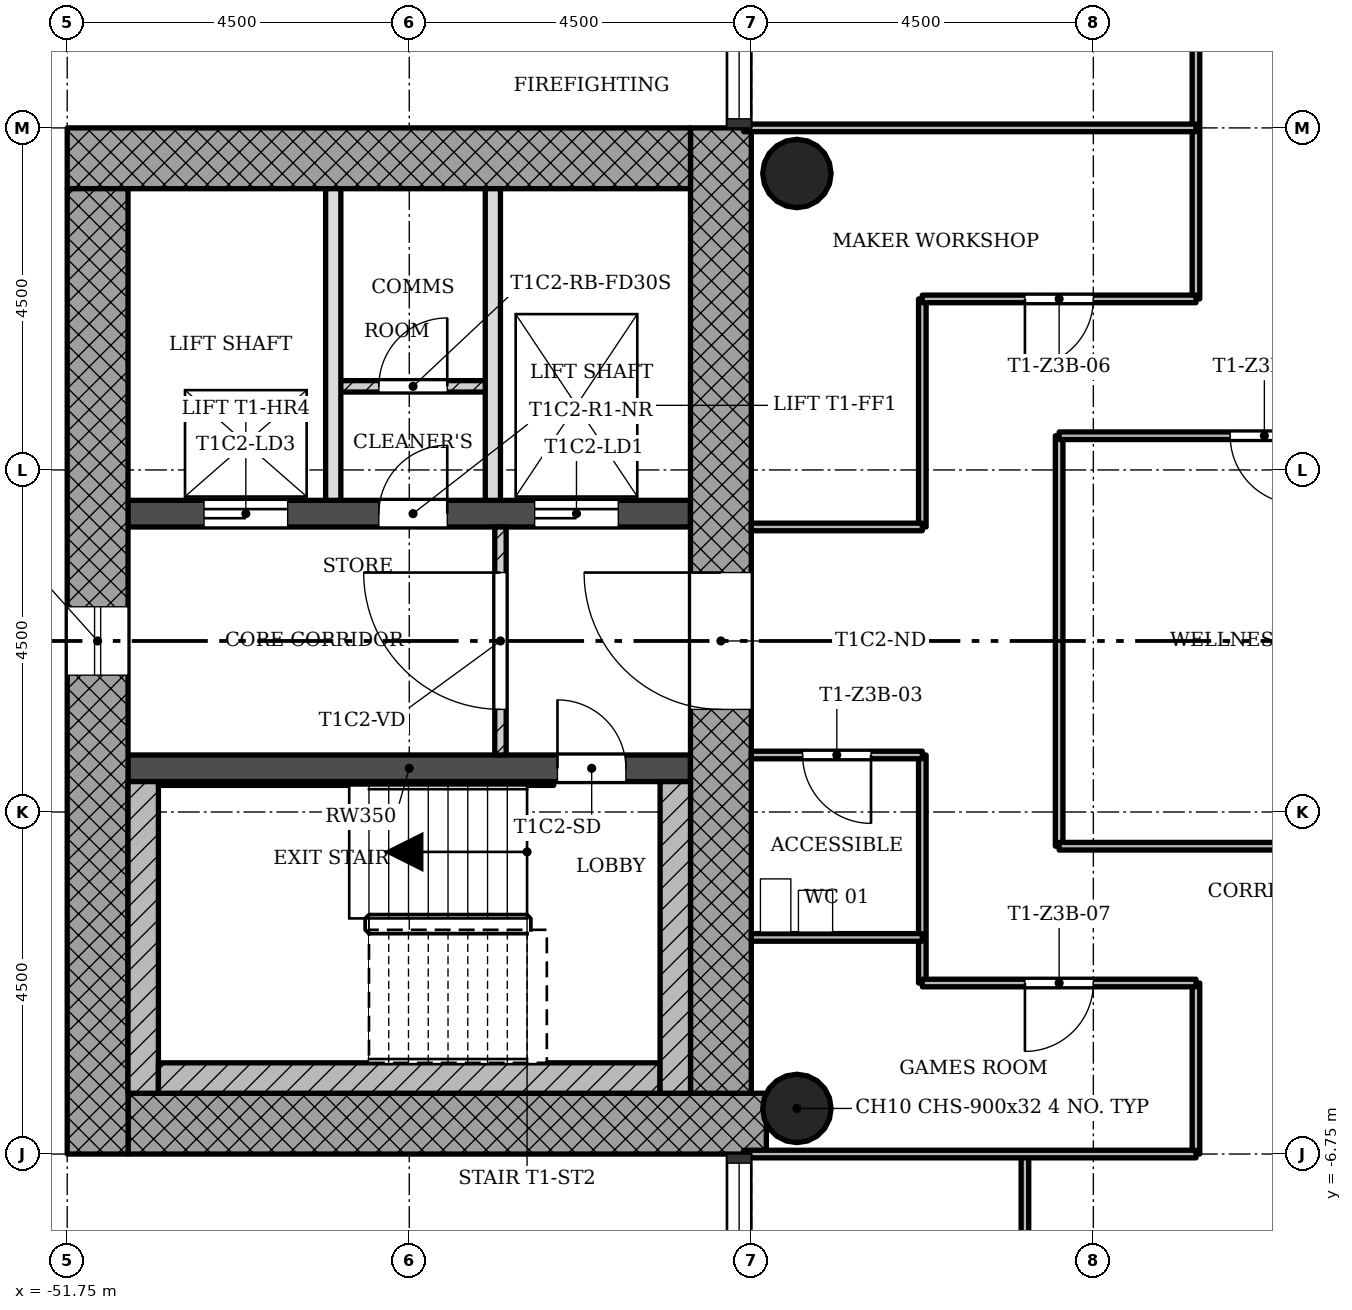
"""IFC4 building model, lengths in metres.
Left out: names, types, materials, properties, quantities, classifications, styles, units other than length and angle.
Written with IfcOpenShell. Run it as: python <this file> out.ifc"""

import sys

from ifc_helpers import new_model, si_unit, direction, frame, frame_2d, origin, origin_2d, place, context, subcontext, project, spatial, rectangle, hollow_circle, extrude, element, fill, save


model = new_model("IFC4")
c1 = context("Model", 3, precision=1e-05, world=origin(), true_north=direction((0.0, 1.0)))
c2 = subcontext(c1, "Body", "Model", "MODEL_VIEW")
j1 = project(units=[si_unit("LENGTHUNIT", "METRE"), si_unit("PLANEANGLEUNIT", "RADIAN")], contexts=[c1])
p1 = place(None, origin())
s1 = spatial("IfcSite", under=j1, at=p1, CompositionType="ELEMENT")
p2 = place(p1, origin())
s2 = spatial("IfcBuilding", under=s1, at=p2, CompositionType="ELEMENT")
p3 = place(p2, frame((0.0, 0.0, 150.7)))
s3 = spatial("IfcBuildingStorey", under=s2, at=p3, CompositionType="ELEMENT", Elevation=150.7)
p4 = place(p3, frame((-50.95, -6.35, 0.0), z_axis=(0.0, 0.0, 1.0), x_axis=(1.0, 0.0, 0.0)))
e1 = element("IfcWall", 1, at=p4, inside=s3, PredefinedType="SHEAR", context=c2, shape_type="SweptSolid", body=[
    extrude(rectangle(XDim=8.398, YDim=0.8, at=frame_2d((4.199, 0.0))), origin(), (0.0, 0.0, 1.0), 3.4),
])
p5 = place(p3, frame((-43.15, -5.95, 0.0), z_axis=(0.0, 0.0, 1.0), x_axis=(0.0, 1.0, 0.0)))
e2 = element("IfcWall", 2, at=p5, inside=s3, PredefinedType="SHEAR", context=c2, shape_type="SweptSolid", body=[
    extrude(rectangle(XDim=12.7, YDim=0.8, at=frame_2d((6.35, 0.0))), origin(), (0.0, 0.0, 1.0), 3.4),
])
p6 = place(p5, frame((5.05, 0.0, 0.0)))
e3 = element("IfcOpeningElement", 3, at=p6, cuts=e2, PredefinedType="OPENING", context=c2, shape_type="SweptSolid", body=[
    extrude(rectangle(XDim=1.8, YDim=2.1, at=frame_2d((0.9, 1.05))), frame((0.0, 0.41, 0.0), z_axis=(0.0, -1.0, 0.0), x_axis=(1.0, 0.0, 0.0)), (0.0, 0.0, 1.0), 0.82),
])
p7 = place(p3, frame((-43.55, 6.35, 0.0), z_axis=(0.0, 0.0, 1.0), x_axis=(-1.0, 0.0, 0.0)))
e4 = element("IfcWall", 4, at=p7, inside=s3, PredefinedType="SHEAR", context=c2, shape_type="SweptSolid", body=[
    extrude(rectangle(XDim=8.2, YDim=0.8, at=frame_2d((4.1, 0.0))), origin(), (0.0, 0.0, 1.0), 3.4),
])
p8 = place(p3, frame((-51.35, 5.95, 0.0), z_axis=(0.0, 0.0, 1.0), x_axis=(0.0, -1.0, 0.0)))
e5 = element("IfcWall", 5, at=p8, inside=s3, PredefinedType="SHEAR", context=c2, shape_type="SweptSolid", body=[
    extrude(rectangle(XDim=12.7, YDim=0.8, at=frame_2d((6.35, 0.0))), origin(), (0.0, 0.0, 1.0), 3.4),
])
p9 = place(p8, frame((5.5, 0.0, 0.45)))
e6 = element("IfcOpeningElement", 6, at=p9, cuts=e5, PredefinedType="OPENING", context=c2, shape_type="SweptSolid", body=[
    extrude(rectangle(XDim=0.9, YDim=2.4, at=frame_2d((0.45, 1.2))), frame((0.0, 0.41, 0.0), z_axis=(0.0, -1.0, 0.0), x_axis=(1.0, 0.0, 0.0)), (0.0, 0.0, 1.0), 0.82),
])
p10 = place(p3, frame((-50.95, -1.675, 0.0), z_axis=(0.0, 0.0, 1.0), x_axis=(1.0, 0.0, 0.0)))
e7 = element("IfcWall", 7, at=p10, inside=s3, PredefinedType="SHEAR", context=c2, shape_type="SweptSolid", body=[
    extrude(rectangle(XDim=7.4, YDim=0.35, at=frame_2d((3.7, 0.0))), origin(), (0.0, 0.0, 1.0), 3.4),
])
p11 = place(p10, frame((5.65, 0.0, 0.0)))
e8 = element("IfcOpeningElement", 8, at=p11, cuts=e7, PredefinedType="OPENING", context=c2, shape_type="SweptSolid", body=[
    extrude(rectangle(XDim=0.9, YDim=2.1, at=frame_2d((0.45, 1.05))), frame((0.0, 0.185, 0.0), z_axis=(0.0, -1.0, 0.0), x_axis=(1.0, 0.0, 0.0)), (0.0, 0.0, 1.0), 0.37),
])
p12 = place(p3, frame((-50.95, 1.675, 0.0), z_axis=(0.0, 0.0, 1.0), x_axis=(1.0, 0.0, 0.0)))
e9 = element("IfcWall", 9, at=p12, inside=s3, PredefinedType="SHEAR", context=c2, shape_type="SweptSolid", body=[
    extrude(rectangle(XDim=7.4, YDim=0.35, at=frame_2d((3.7, 0.0))), origin(), (0.0, 0.0, 1.0), 3.4),
])
p13 = place(p12, frame((5.35, 0.0, 0.0)))
e10 = element("IfcOpeningElement", 10, at=p13, cuts=e9, PredefinedType="OPENING", context=c2, shape_type="SweptSolid", body=[
    extrude(rectangle(XDim=1.1, YDim=2.1, at=frame_2d((0.55, 1.05))), frame((0.0, 0.185, 0.0), z_axis=(0.0, -1.0, 0.0), x_axis=(1.0, 0.0, 0.0)), (0.0, 0.0, 1.0), 0.37),
])
p14 = place(p12, frame((1.0, 0.0, 0.0)))
e11 = element("IfcOpeningElement", 11, at=p14, cuts=e9, PredefinedType="OPENING", context=c2, shape_type="SweptSolid", body=[
    extrude(rectangle(XDim=1.1, YDim=2.1, at=frame_2d((0.55, 1.05))), frame((0.0, 0.185, 0.0), z_axis=(0.0, -1.0, 0.0), x_axis=(1.0, 0.0, 0.0)), (0.0, 0.0, 1.0), 0.37),
])
p15 = place(p12, frame((3.3, 0.0, 0.0)))
e12 = element("IfcOpeningElement", 12, at=p15, cuts=e9, PredefinedType="OPENING", context=c2, shape_type="SweptSolid", body=[
    extrude(rectangle(XDim=0.9, YDim=2.1, at=frame_2d((0.45, 1.05))), frame((0.0, 0.185, 0.0), z_axis=(0.0, -1.0, 0.0), x_axis=(1.0, 0.0, 0.0)), (0.0, 0.0, 1.0), 0.37),
])
for number, where, z_axis, x_axis in (
    (13, (-42.15, -6.15, 0.0), (0.0, 0.0, 1.0), (1.0, 0.0, 0.0)),
    (14, (-42.15, 6.15, 0.0), (0.0, 0.0, 1.0), (1.0, 0.0, 0.0)),
):
    element("IfcColumn", number, at=place(p3, frame(where, z_axis=z_axis, x_axis=x_axis)), inside=s3, PredefinedType="COLUMN", context=c2, shape_type="SweptSolid", body=[
        extrude(hollow_circle(Radius=0.45, WallThickness=0.032, at=origin_2d()), origin(), (0.0, 0.0, 1.0), 3.4),
    ])
p16 = place(p3, frame((-46.05, 1.5, 0.0), z_axis=(0.0, 0.0, 1.0), x_axis=(0.0, -1.0, 0.0)))
e15 = element("IfcWall", 15, at=p16, inside=s3, PredefinedType="PARTITIONING", context=c2, shape_type="SweptSolid", body=[
    extrude(rectangle(XDim=3.0, YDim=0.15, at=frame_2d((1.5, 0.0))), origin(), (0.0, 0.0, 1.0), 3.0),
])
p17 = place(p16, frame((0.6, 0.0, 0.0)))
e16 = element("IfcOpeningElement", 16, at=p17, cuts=e15, PredefinedType="OPENING", context=c2, shape_type="SweptSolid", body=[
    extrude(rectangle(XDim=1.8, YDim=2.1, at=frame_2d((0.9, 1.05))), frame((0.0, 0.085, 0.0), z_axis=(0.0, -1.0, 0.0), x_axis=(1.0, 0.0, 0.0)), (0.0, 0.0, 1.0), 0.17),
])
for number, where, z_axis, x_axis in (
    (17, (-48.25, 5.95, 0.0), (0.0, 0.0, 1.0), (0.0, -1.0, 0.0)),
    (18, (-46.15, 5.95, 0.0), (0.0, 0.0, 1.0), (0.0, -1.0, 0.0)),
):
    element("IfcWall", number, at=place(p3, frame(where, z_axis=z_axis, x_axis=x_axis)), inside=s3, PredefinedType="SOLIDWALL", context=c2, shape_type="SweptSolid", body=[
        extrude(rectangle(XDim=4.1, YDim=0.2, at=frame_2d((2.05, 0.0))), origin(), (0.0, 0.0, 1.0), 3.0),
    ])
p18 = place(p3, frame((-46.15, 3.35, 0.0), z_axis=(0.0, 0.0, 1.0), x_axis=(-1.0, 0.0, 0.0)))
e19 = element("IfcWall", 19, at=p18, inside=s3, PredefinedType="PARTITIONING", context=c2, shape_type="SweptSolid", body=[
    extrude(rectangle(XDim=2.1, YDim=0.15, at=frame_2d((1.05, 0.0))), origin(), (0.0, 0.0, 1.0), 3.0),
])
p19 = place(p18, frame((0.6, 0.0, 0.0)))
e20 = element("IfcOpeningElement", 20, at=p19, cuts=e19, PredefinedType="OPENING", context=c2, shape_type="SweptSolid", body=[
    extrude(rectangle(XDim=0.9, YDim=2.1, at=frame_2d((0.45, 1.05))), frame((0.0, 0.085, 0.0), z_axis=(0.0, -1.0, 0.0), x_axis=(1.0, 0.0, 0.0)), (0.0, 0.0, 1.0), 0.17),
])
for number, where, z_axis, x_axis in (
    (21, (-40.5, -4.5, 0.0), (0.0, 0.0, 1.0), (0.0, 1.0, 0.0)),
    (22, (-40.5, 1.5, 0.0), (0.0, 0.0, 1.0), (0.0, 1.0, 0.0)),
):
    element("IfcWall", number, at=place(p3, frame(where, z_axis=z_axis, x_axis=x_axis)), inside=s3, PredefinedType="PARTITIONING", context=c2, shape_type="SweptSolid", body=[
        extrude(rectangle(XDim=3.0, YDim=0.1, at=frame_2d((1.5, 0.0))), origin(), (0.0, 0.0, 1.0), 3.0),
    ])
p20 = place(p3, frame((-39.15, -15.75, 0.0), z_axis=(0.0, 0.0, 1.0), x_axis=(0.0, 1.0, 0.0)))
e23 = element("IfcWall", 23, at=p20, inside=s3, PredefinedType="PARTITIONING", context=c2, shape_type="SweptSolid", body=[
    extrude(rectangle(XDim=9.0, YDim=0.1, at=frame_2d((4.5, 0.0))), origin(), (0.0, 0.0, 1.0), 3.0),
])
p21 = place(p20, frame((5.55, 0.0, 0.0)))
e24 = element("IfcOpeningElement", 24, at=p21, cuts=e23, PredefinedType="OPENING", context=c2, shape_type="SweptSolid", body=[
    extrude(rectangle(XDim=0.9, YDim=2.1, at=frame_2d((0.45, 1.05))), frame((0.0, 0.06, 0.0), z_axis=(0.0, -1.0, 0.0), x_axis=(1.0, 0.0, 0.0)), (0.0, 0.0, 1.0), 0.12),
])
p22 = place(p3, frame((-38.7, -2.7, 0.0), z_axis=(0.0, 0.0, 1.0), x_axis=(0.0, 1.0, 0.0)))
e25 = element("IfcWall", 25, at=p22, inside=s3, PredefinedType="PARTITIONING", context=c2, shape_type="SweptSolid", body=[
    extrude(rectangle(XDim=5.4, YDim=0.1, at=frame_2d((2.7, 0.0))), origin(), (0.0, 0.0, 1.0), 3.0),
])
p23 = place(p3, frame((-36.9, -6.75, 0.0), z_axis=(0.0, 0.0, 1.0), x_axis=(0.0, 1.0, 0.0)))
e26 = element("IfcWall", 26, at=p23, inside=s3, PredefinedType="PARTITIONING", context=c2, shape_type="SweptSolid", body=[
    extrude(rectangle(XDim=2.25, YDim=0.1, at=frame_2d((1.125, 0.0))), origin(), (0.0, 0.0, 1.0), 3.0),
])
p24 = place(p3, frame((-36.9, 4.5, 0.0), z_axis=(0.0, 0.0, 1.0), x_axis=(0.0, 1.0, 0.0)))
e27 = element("IfcWall", 27, at=p24, inside=s3, PredefinedType="PARTITIONING", context=c2, shape_type="SweptSolid", body=[
    extrude(rectangle(XDim=6.75, YDim=0.1, at=frame_2d((3.375, 0.0))), origin(), (0.0, 0.0, 1.0), 3.0),
])
p25 = place(p24, frame((4.05, 0.0, 0.0)))
e28 = element("IfcOpeningElement", 28, at=p25, cuts=e27, PredefinedType="OPENING", context=c2, shape_type="SweptSolid", body=[
    extrude(rectangle(XDim=0.9, YDim=2.1, at=frame_2d((0.45, 1.05))), frame((0.0, 0.06, 0.0), z_axis=(0.0, -1.0, 0.0), x_axis=(1.0, 0.0, 0.0)), (0.0, 0.0, 1.0), 0.12),
])
p26 = place(p3, frame((-42.85, -6.75, 0.0), z_axis=(0.0, 0.0, 1.0), x_axis=(1.0, 0.0, 0.0)))
e29 = element("IfcWall", 29, at=p26, inside=s3, PredefinedType="PARTITIONING", context=c2, shape_type="SweptSolid", body=[
    extrude(rectangle(XDim=5.95, YDim=0.1, at=frame_2d((2.975, 0.0))), origin(), (0.0, 0.0, 1.0), 3.0),
])
p27 = place(p3, frame((-40.5, -4.5, 0.0), z_axis=(0.0, 0.0, 1.0), x_axis=(1.0, 0.0, 0.0)))
e30 = element("IfcWall", 30, at=p27, inside=s3, PredefinedType="PARTITIONING", context=c2, shape_type="SweptSolid", body=[
    extrude(rectangle(XDim=3.6, YDim=0.1, at=frame_2d((1.8, 0.0))), origin(), (0.0, 0.0, 1.0), 3.0),
])
p28 = place(p27, frame((1.35, 0.0, 0.0)))
e31 = element("IfcOpeningElement", 31, at=p28, cuts=e30, PredefinedType="OPENING", context=c2, shape_type="SweptSolid", body=[
    extrude(rectangle(XDim=0.9, YDim=2.1, at=frame_2d((0.45, 1.05))), frame((0.0, 0.06, 0.0), z_axis=(0.0, -1.0, 0.0), x_axis=(1.0, 0.0, 0.0)), (0.0, 0.0, 1.0), 0.12),
])
p29 = place(p3, frame((-42.75, -3.9, 0.0), z_axis=(0.0, 0.0, 1.0), x_axis=(1.0, 0.0, 0.0)))
e32 = element("IfcWall", 32, at=p29, inside=s3, PredefinedType="PARTITIONING", context=c2, shape_type="SweptSolid", body=[
    extrude(rectangle(XDim=2.25, YDim=0.1, at=frame_2d((1.125, 0.0))), origin(), (0.0, 0.0, 1.0), 3.0),
])
p30 = place(p3, frame((-38.7, -2.7, 0.0), z_axis=(0.0, 0.0, 1.0), x_axis=(1.0, 0.0, 0.0)))
e33 = element("IfcWall", 33, at=p30, inside=s3, PredefinedType="PARTITIONING", context=c2, shape_type="SweptSolid", body=[
    extrude(rectangle(XDim=5.4, YDim=0.1, at=frame_2d((2.7, 0.0))), origin(), (0.0, 0.0, 1.0), 3.0),
])
p31 = place(p3, frame((-42.75, -1.5, 0.0), z_axis=(0.0, 0.0, 1.0), x_axis=(1.0, 0.0, 0.0)))
e34 = element("IfcWall", 34, at=p31, inside=s3, PredefinedType="PARTITIONING", context=c2, shape_type="SweptSolid", body=[
    extrude(rectangle(XDim=2.25, YDim=0.1, at=frame_2d((1.125, 0.0))), origin(), (0.0, 0.0, 1.0), 3.0),
])
p32 = place(p31, frame((0.675, 0.0, 0.0)))
e35 = element("IfcOpeningElement", 35, at=p32, cuts=e34, PredefinedType="OPENING", context=c2, shape_type="SweptSolid", body=[
    extrude(rectangle(XDim=0.9, YDim=2.1, at=frame_2d((0.45, 1.05))), frame((0.0, 0.06, 0.0), z_axis=(0.0, -1.0, 0.0), x_axis=(1.0, 0.0, 0.0)), (0.0, 0.0, 1.0), 0.12),
])
p33 = place(p3, frame((-42.75, 1.5, 0.0), z_axis=(0.0, 0.0, 1.0), x_axis=(1.0, 0.0, 0.0)))
e36 = element("IfcWall", 36, at=p33, inside=s3, PredefinedType="PARTITIONING", context=c2, shape_type="SweptSolid", body=[
    extrude(rectangle(XDim=2.25, YDim=0.1, at=frame_2d((1.125, 0.0))), origin(), (0.0, 0.0, 1.0), 3.0),
])
p34 = place(p3, frame((-38.7, 2.7, 0.0), z_axis=(0.0, 0.0, 1.0), x_axis=(1.0, 0.0, 0.0)))
e37 = element("IfcWall", 37, at=p34, inside=s3, PredefinedType="PARTITIONING", context=c2, shape_type="SweptSolid", body=[
    extrude(rectangle(XDim=5.4, YDim=0.1, at=frame_2d((2.7, 0.0))), origin(), (0.0, 0.0, 1.0), 3.0),
])
p35 = place(p34, frame((2.25, 0.0, 0.0)))
e38 = element("IfcOpeningElement", 38, at=p35, cuts=e37, PredefinedType="OPENING", context=c2, shape_type="SweptSolid", body=[
    extrude(rectangle(XDim=0.9, YDim=2.1, at=frame_2d((0.45, 1.05))), frame((0.0, 0.06, 0.0), z_axis=(0.0, -1.0, 0.0), x_axis=(1.0, 0.0, 0.0)), (0.0, 0.0, 1.0), 0.12),
])
p36 = place(p3, frame((-40.5, 4.5, 0.0), z_axis=(0.0, 0.0, 1.0), x_axis=(1.0, 0.0, 0.0)))
e39 = element("IfcWall", 39, at=p36, inside=s3, PredefinedType="PARTITIONING", context=c2, shape_type="SweptSolid", body=[
    extrude(rectangle(XDim=3.6, YDim=0.1, at=frame_2d((1.8, 0.0))), origin(), (0.0, 0.0, 1.0), 3.0),
])
p37 = place(p36, frame((1.35, 0.0, 0.0)))
e40 = element("IfcOpeningElement", 40, at=p37, cuts=e39, PredefinedType="OPENING", context=c2, shape_type="SweptSolid", body=[
    extrude(rectangle(XDim=0.9, YDim=2.1, at=frame_2d((0.45, 1.05))), frame((0.0, 0.06, 0.0), z_axis=(0.0, -1.0, 0.0), x_axis=(1.0, 0.0, 0.0)), (0.0, 0.0, 1.0), 0.12),
])
p38 = place(p3, frame((-42.85, 6.75, 0.0), z_axis=(0.0, 0.0, 1.0), x_axis=(1.0, 0.0, 0.0)))
e41 = element("IfcWall", 41, at=p38, inside=s3, PredefinedType="PARTITIONING", context=c2, shape_type="SweptSolid", body=[
    extrude(rectangle(XDim=5.95, YDim=0.1, at=frame_2d((2.975, 0.0))), origin(), (0.0, 0.0, 1.0), 3.0),
])
p39 = place(p3, frame((-50.75, -1.85, 0.0), z_axis=(0.0, 0.0, 1.0), x_axis=(0.0, -1.0, 0.0)))
e42 = element("IfcWall", 42, at=p39, inside=s3, PredefinedType="SHEAR", context=c2, shape_type="SweptSolid", body=[
    extrude(rectangle(XDim=4.1, YDim=0.4, at=frame_2d((2.05, 0.0))), origin(), (0.0, 0.0, 1.0), 3.4),
])
p40 = place(p3, frame((-43.95, -5.75, 0.0), z_axis=(0.0, 0.0, 1.0), x_axis=(-1.0, 0.0, 0.0)))
e43 = element("IfcWall", 43, at=p40, inside=s3, PredefinedType="SHEAR", context=c2, shape_type="SweptSolid", body=[
    extrude(rectangle(XDim=6.6, YDim=0.4, at=frame_2d((3.3, 0.0))), origin(), (0.0, 0.0, 1.0), 3.4),
])
p41 = place(p3, frame((-43.75, -1.85, 0.0), z_axis=(0.0, 0.0, 1.0), x_axis=(0.0, -1.0, 0.0)))
e44 = element("IfcWall", 44, at=p41, inside=s3, PredefinedType="SHEAR", context=c2, shape_type="SweptSolid", body=[
    extrude(rectangle(XDim=4.1, YDim=0.4, at=frame_2d((2.05, 0.0))), origin(), (0.0, 0.0, 1.0), 3.4),
])
p42 = place(p3, frame((-45.35, -1.875, 0.0), z_axis=(0.0, 0.0, 1.0), x_axis=(-1.0, 0.0, 0.0)))
e45 = element("IfcWall", 45, at=p42, inside=s3, PredefinedType="SHEAR", context=c2, shape_type="SweptSolid", body=[
    extrude(rectangle(XDim=5.2, YDim=0.05, at=frame_2d((2.6, 0.0))), origin(), (0.0, 0.0, 1.0), 3.4),
])
p43 = place(p9, origin())
e46 = element("IfcWindow", 46, at=p43, inside=s3, PartitioningType="SINGLE_PANEL", PredefinedType="WINDOW", context=c2, shape_type="SweptSolid", body=[
    extrude(rectangle(XDim=0.9, YDim=2.4, at=frame_2d((0.45, 1.2))), frame((0.0, 0.03, 0.0), z_axis=(0.0, -1.0, 0.0), x_axis=(1.0, 0.0, 0.0)), (0.0, 0.0, 1.0), 0.06),
])
fill(e6, e46)
p44 = place(p17, origin())
e47 = element("IfcDoor", 47, at=p44, inside=s3, OperationType="SINGLE_SWING_LEFT", PredefinedType="DOOR", context=c2, shape_type="SweptSolid", body=[
    extrude(rectangle(XDim=1.8, YDim=2.1, at=frame_2d((0.9, 1.05))), frame((0.0, 0.025, 0.0), z_axis=(0.0, -1.0, 0.0), x_axis=(1.0, 0.0, 0.0)), (0.0, 0.0, 1.0), 0.05),
])
fill(e16, e47)
p45 = place(p19, origin())
e48 = element("IfcDoor", 48, at=p45, inside=s3, OperationType="SINGLE_SWING_LEFT", PredefinedType="DOOR", context=c2, shape_type="SweptSolid", body=[
    extrude(rectangle(XDim=0.9, YDim=2.1, at=frame_2d((0.45, 1.05))), frame((0.0, 0.025, 0.0), z_axis=(0.0, -1.0, 0.0), x_axis=(1.0, 0.0, 0.0)), (0.0, 0.0, 1.0), 0.05),
])
fill(e20, e48)
p46 = place(p35, origin())
e49 = element("IfcDoor", 49, at=p46, inside=s3, OperationType="SINGLE_SWING_RIGHT", PredefinedType="DOOR", context=c2, shape_type="SweptSolid", body=[
    extrude(rectangle(XDim=0.9, YDim=2.1, at=frame_2d((0.45, 1.05))), frame((0.0, 0.025, 0.0), z_axis=(0.0, -1.0, 0.0), x_axis=(1.0, 0.0, 0.0)), (0.0, 0.0, 1.0), 0.05),
])
fill(e38, e49)
p47 = place(p32, origin())
e50 = element("IfcDoor", 50, at=p47, inside=s3, OperationType="SINGLE_SWING_RIGHT", PredefinedType="DOOR", context=c2, shape_type="SweptSolid", body=[
    extrude(rectangle(XDim=0.9, YDim=2.1, at=frame_2d((0.45, 1.05))), frame((0.0, 0.025, 0.0), z_axis=(0.0, -1.0, 0.0), x_axis=(1.0, 0.0, 0.0)), (0.0, 0.0, 1.0), 0.05),
])
fill(e35, e50)
p48 = place(p37, origin())
e51 = element("IfcDoor", 51, at=p48, inside=s3, OperationType="SINGLE_SWING_LEFT", PredefinedType="DOOR", context=c2, shape_type="SweptSolid", body=[
    extrude(rectangle(XDim=0.9, YDim=2.1, at=frame_2d((0.45, 1.05))), frame((0.0, 0.025, 0.0), z_axis=(0.0, -1.0, 0.0), x_axis=(1.0, 0.0, 0.0)), (0.0, 0.0, 1.0), 0.05),
])
fill(e40, e51)
p49 = place(p28, origin())
e52 = element("IfcDoor", 52, at=p49, inside=s3, OperationType="SINGLE_SWING_LEFT", PredefinedType="DOOR", context=c2, shape_type="SweptSolid", body=[
    extrude(rectangle(XDim=0.9, YDim=2.1, at=frame_2d((0.45, 1.05))), frame((0.0, 0.025, 0.0), z_axis=(0.0, -1.0, 0.0), x_axis=(1.0, 0.0, 0.0)), (0.0, 0.0, 1.0), 0.05),
])
fill(e31, e52)
p50 = place(p11, origin())
e53 = element("IfcDoor", 53, at=p50, inside=s3, OperationType="SINGLE_SWING_RIGHT", PredefinedType="DOOR", context=c2, shape_type="SweptSolid", body=[
    extrude(rectangle(XDim=0.9, YDim=2.1, at=frame_2d((0.45, 1.05))), frame((0.0, 0.025, 0.0), z_axis=(0.0, -1.0, 0.0), x_axis=(1.0, 0.0, 0.0)), (0.0, 0.0, 1.0), 0.05),
])
fill(e8, e53)
p51 = place(p13, origin())
e54 = element("IfcDoor", 54, at=p51, inside=s3, OperationType="SLIDING_TO_LEFT", PredefinedType="DOOR", context=c2, shape_type="SweptSolid", body=[
    extrude(rectangle(XDim=1.1, YDim=2.1, at=frame_2d((0.55, 1.05))), frame((0.0, 0.025, 0.0), z_axis=(0.0, -1.0, 0.0), x_axis=(1.0, 0.0, 0.0)), (0.0, 0.0, 1.0), 0.05),
])
fill(e10, e54)
p52 = place(p14, origin())
e55 = element("IfcDoor", 55, at=p52, inside=s3, OperationType="SLIDING_TO_LEFT", PredefinedType="DOOR", context=c2, shape_type="SweptSolid", body=[
    extrude(rectangle(XDim=1.1, YDim=2.1, at=frame_2d((0.55, 1.05))), frame((0.0, 0.025, 0.0), z_axis=(0.0, -1.0, 0.0), x_axis=(1.0, 0.0, 0.0)), (0.0, 0.0, 1.0), 0.05),
])
fill(e11, e55)
p53 = place(p15, origin())
e56 = element("IfcDoor", 56, at=p53, inside=s3, OperationType="SINGLE_SWING_LEFT", PredefinedType="DOOR", context=c2, shape_type="SweptSolid", body=[
    extrude(rectangle(XDim=0.9, YDim=2.1, at=frame_2d((0.45, 1.05))), frame((0.0, 0.025, 0.0), z_axis=(0.0, -1.0, 0.0), x_axis=(1.0, 0.0, 0.0)), (0.0, 0.0, 1.0), 0.05),
])
fill(e12, e56)
p54 = place(p6, origin())
e57 = element("IfcDoor", 57, at=p54, inside=s3, OperationType="SINGLE_SWING_LEFT", PredefinedType="DOOR", context=c2, shape_type="SweptSolid", body=[
    extrude(rectangle(XDim=1.8, YDim=2.1, at=frame_2d((0.9, 1.05))), frame((0.0, 0.025, 0.0), z_axis=(0.0, -1.0, 0.0), x_axis=(1.0, 0.0, 0.0)), (0.0, 0.0, 1.0), 0.05),
])
fill(e3, e57)
save(model, sys.argv[1])
